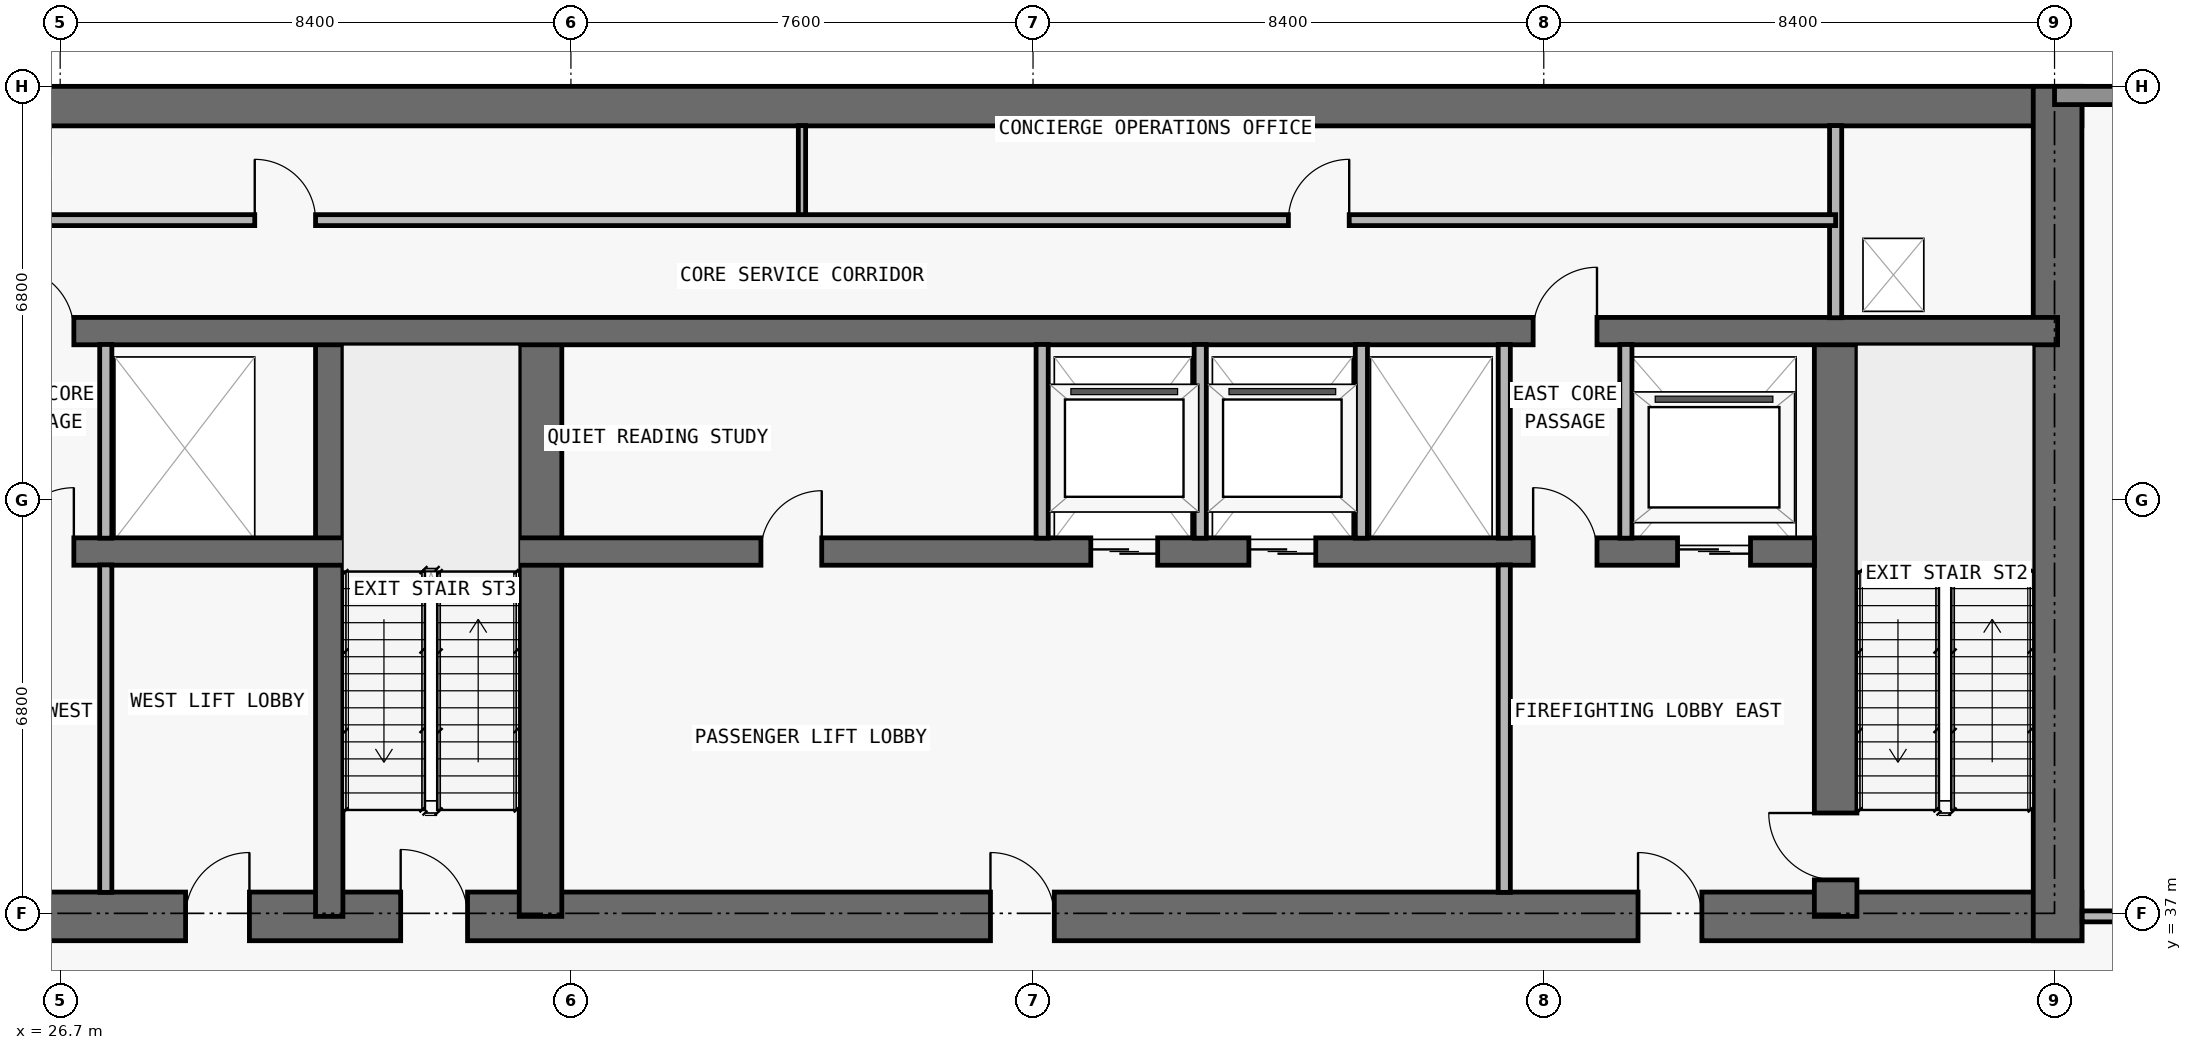
"""IFC4 building model, lengths in metres.
Left out: names, types, materials, properties, quantities, classifications, styles, units other than length and angle.
Written with IfcOpenShell. Run it as: python <this file> out.ifc"""

import sys

from ifc_helpers import new_model, si_unit, direction, frame, frame_2d, origin, place, context, subcontext, project, spatial, rectangle, extrude, element, fill, save


model = new_model("IFC4")
c1 = context("Model", 3, precision=1e-05, world=origin(), true_north=direction((0.0, 1.0)))
c2 = subcontext(c1, "Body", "Model", "MODEL_VIEW")
j1 = project(units=[si_unit("LENGTHUNIT", "METRE"), si_unit("PLANEANGLEUNIT", "RADIAN")], contexts=[c1])
p1 = place(None, origin())
s1 = spatial("IfcSite", under=j1, at=p1, CompositionType="ELEMENT")
p2 = place(p1, origin())
s2 = spatial("IfcBuilding", under=s1, at=p2, CompositionType="ELEMENT")
p3 = place(p2, frame((0.0, 0.0, 152.1)))
s3 = spatial("IfcBuildingStorey", under=s2, at=p3, CompositionType="ELEMENT", Elevation=152.1)
p4 = place(p3, frame((17.85, 36.95, 0.0), z_axis=(0.0, 0.0, 1.0), x_axis=(1.0, 0.0, 0.0)))
e1 = element("IfcWall", 1, at=p4, inside=s3, PredefinedType="SHEAR", context=c2, shape_type="SweptSolid", body=[
    extrude(rectangle(XDim=42.1, YDim=0.8, at=frame_2d((21.05, 0.0))), origin(), (0.0, 0.0, 1.0), 4.85),
])
p5 = place(p4, frame((14.45, 0.0, 0.0)))
e2 = element("IfcOpeningElement", 2, at=p5, cuts=e1, PredefinedType="OPENING", context=c2, shape_type="SweptSolid", body=[
    extrude(rectangle(XDim=1.1, YDim=2.15, at=frame_2d((0.55, 1.075))), frame((0.0, 0.41, 0.0), z_axis=(0.0, -1.0, 0.0), x_axis=(1.0, 0.0, 0.0)), (0.0, 0.0, 1.0), 0.82),
])
p6 = place(p4, frame((6.3, 0.0, 0.0)))
e3 = element("IfcOpeningElement", 3, at=p6, cuts=e1, PredefinedType="OPENING", context=c2, shape_type="SweptSolid", body=[
    extrude(rectangle(XDim=1.05, YDim=2.15, at=frame_2d((0.525, 1.075))), frame((0.0, 0.41, 0.0), z_axis=(0.0, -1.0, 0.0), x_axis=(1.0, 0.0, 0.0)), (0.0, 0.0, 1.0), 0.82),
])
p7 = place(p4, frame((34.8, 0.0, 0.0)))
e4 = element("IfcOpeningElement", 4, at=p7, cuts=e1, PredefinedType="OPENING", context=c2, shape_type="SweptSolid", body=[
    extrude(rectangle(XDim=1.05, YDim=2.15, at=frame_2d((0.525, 1.075))), frame((0.0, 0.41, 0.0), z_axis=(0.0, -1.0, 0.0), x_axis=(1.0, 0.0, 0.0)), (0.0, 0.0, 1.0), 0.82),
])
p8 = place(p4, frame((10.913, 0.0, 0.0)))
e5 = element("IfcOpeningElement", 5, at=p8, cuts=e1, PredefinedType="OPENING", context=c2, shape_type="SweptSolid", body=[
    extrude(rectangle(XDim=1.05, YDim=2.15, at=frame_2d((0.525, 1.075))), frame((0.0, 0.41, 0.0), z_axis=(0.0, -1.0, 0.0), x_axis=(1.0, 0.0, 0.0)), (0.0, 0.0, 1.0), 0.82),
])
p9 = place(p4, frame((24.15, 0.0, 0.0)))
e6 = element("IfcOpeningElement", 6, at=p9, cuts=e1, PredefinedType="OPENING", context=c2, shape_type="SweptSolid", body=[
    extrude(rectangle(XDim=1.05, YDim=2.15, at=frame_2d((0.525, 1.075))), frame((0.0, 0.41, 0.0), z_axis=(0.0, -1.0, 0.0), x_axis=(1.0, 0.0, 0.0)), (0.0, 0.0, 1.0), 0.82),
])
p10 = place(p3, frame((17.85, 50.275, 0.0), z_axis=(0.0, 0.0, 1.0), x_axis=(1.0, 0.0, 0.0)))
e7 = element("IfcWall", 7, at=p10, inside=s3, PredefinedType="SHEAR", context=c2, shape_type="SweptSolid", body=[
    extrude(rectangle(XDim=42.1, YDim=0.65, at=frame_2d((21.05, 0.0))), origin(), (0.0, 0.0, 1.0), 4.85),
])
p11 = place(p3, frame((59.55, 36.55, 0.0), z_axis=(0.0, 0.0, 1.0), x_axis=(0.0, 1.0, 0.0)))
e8 = element("IfcWall", 8, at=p11, inside=s3, PredefinedType="SHEAR", context=c2, shape_type="SweptSolid", body=[
    extrude(rectangle(XDim=14.05, YDim=0.8, at=frame_2d((7.025, 0.0))), origin(), (0.0, 0.0, 1.0), 4.85),
])
p12 = place(p3, frame((55.9, 36.95, 0.0), z_axis=(0.0, 0.0, 1.0), x_axis=(0.0, 1.0, 0.0)))
e9 = element("IfcWall", 9, at=p12, inside=s3, PredefinedType="SHEAR", context=c2, shape_type="SweptSolid", body=[
    extrude(rectangle(XDim=9.625, YDim=0.7, at=frame_2d((4.812, 0.0))), origin(), (0.0, 0.0, 1.0), 4.85),
])
p13 = place(p12, frame((0.6, 0.0, 0.0)))
e10 = element("IfcOpeningElement", 10, at=p13, cuts=e9, PredefinedType="OPENING", context=c2, shape_type="SweptSolid", body=[
    extrude(rectangle(XDim=1.1, YDim=2.15, at=frame_2d((0.55, 1.075))), frame((0.0, 0.36, 0.0), z_axis=(0.0, -1.0, 0.0), x_axis=(1.0, 0.0, 0.0)), (0.0, 0.0, 1.0), 0.72),
])
p14 = place(p3, frame((31.125, 36.95, 0.0), z_axis=(0.0, 0.0, 1.0), x_axis=(0.0, 1.0, 0.0)))
e11 = element("IfcWall", 11, at=p14, inside=s3, PredefinedType="SHEAR", context=c2, shape_type="SweptSolid", body=[
    extrude(rectangle(XDim=9.625, YDim=0.45, at=frame_2d((4.812, 0.0))), origin(), (0.0, 0.0, 1.0), 4.85),
])
p15 = place(p3, frame((34.6, 36.95, 0.0), z_axis=(0.0, 0.0, 1.0), x_axis=(0.0, 1.0, 0.0)))
e12 = element("IfcWall", 12, at=p15, inside=s3, PredefinedType="SHEAR", context=c2, shape_type="SweptSolid", body=[
    extrude(rectangle(XDim=9.625, YDim=0.7, at=frame_2d((4.812, 0.0))), origin(), (0.0, 0.0, 1.0), 4.85),
])
p16 = place(p3, frame((22.25, 42.95, 0.0), z_axis=(0.0, 0.0, 1.0), x_axis=(1.0, 0.0, 0.0)))
e13 = element("IfcWall", 13, at=p16, inside=s3, PredefinedType="SHEAR", context=c2, shape_type="SweptSolid", body=[
    extrude(rectangle(XDim=33.3, YDim=0.45, at=frame_2d((16.65, 0.0))), origin(), (0.0, 0.0, 1.0), 4.85),
])
p17 = place(p16, frame((1.05, 0.0, 0.0)))
e14 = element("IfcOpeningElement", 14, at=p17, cuts=e13, PredefinedType="OPENING", context=c2, shape_type="SweptSolid", body=[
    extrude(rectangle(XDim=1.2, YDim=2.2, at=frame_2d((0.6, 1.1))), frame((0.0, 0.235, 0.0), z_axis=(0.0, -1.0, 0.0), x_axis=(1.0, 0.0, 0.0)), (0.0, 0.0, 1.0), 0.47),
])
p18 = place(p16, frame((31.05, 0.0, 0.0)))
e15 = element("IfcOpeningElement", 15, at=p18, cuts=e13, PredefinedType="OPENING", context=c2, shape_type="SweptSolid", body=[
    extrude(rectangle(XDim=1.2, YDim=2.2, at=frame_2d((0.6, 1.1))), frame((0.0, 0.235, 0.0), z_axis=(0.0, -1.0, 0.0), x_axis=(1.0, 0.0, 0.0)), (0.0, 0.0, 1.0), 0.47),
])
p19 = place(p16, frame((21.4, 0.0, 0.0)))
e16 = element("IfcOpeningElement", 16, at=p19, cuts=e13, PredefinedType="OPENING", context=c2, shape_type="SweptSolid", body=[
    extrude(rectangle(XDim=1.1, YDim=2.2, at=frame_2d((0.55, 1.1))), frame((0.0, 0.235, 0.0), z_axis=(0.0, -1.0, 0.0), x_axis=(1.0, 0.0, 0.0)), (0.0, 0.0, 1.0), 0.47),
])
p20 = place(p16, frame((24.0, 0.0, 0.0)))
e17 = element("IfcOpeningElement", 17, at=p20, cuts=e13, PredefinedType="OPENING", context=c2, shape_type="SweptSolid", body=[
    extrude(rectangle(XDim=1.1, YDim=2.2, at=frame_2d((0.55, 1.1))), frame((0.0, 0.235, 0.0), z_axis=(0.0, -1.0, 0.0), x_axis=(1.0, 0.0, 0.0)), (0.0, 0.0, 1.0), 0.47),
])
p21 = place(p16, frame((3.625, 0.0, 0.0)))
e18 = element("IfcOpeningElement", 18, at=p21, cuts=e13, PredefinedType="OPENING", context=c2, shape_type="SweptSolid", body=[
    extrude(rectangle(XDim=1.05, YDim=2.15, at=frame_2d((0.525, 1.075))), frame((0.0, 0.235, 0.0), z_axis=(0.0, -1.0, 0.0), x_axis=(1.0, 0.0, 0.0)), (0.0, 0.0, 1.0), 0.47),
])
p22 = place(p16, frame((28.675, 0.0, 0.0)))
e19 = element("IfcOpeningElement", 19, at=p22, cuts=e13, PredefinedType="OPENING", context=c2, shape_type="SweptSolid", body=[
    extrude(rectangle(XDim=1.05, YDim=2.15, at=frame_2d((0.525, 1.075))), frame((0.0, 0.235, 0.0), z_axis=(0.0, -1.0, 0.0), x_axis=(1.0, 0.0, 0.0)), (0.0, 0.0, 1.0), 0.47),
])
p23 = place(p16, frame((15.975, 0.0, 0.0)))
e20 = element("IfcOpeningElement", 20, at=p23, cuts=e13, PredefinedType="OPENING", context=c2, shape_type="SweptSolid", body=[
    extrude(rectangle(XDim=1.0, YDim=2.2, at=frame_2d((0.5, 1.1))), frame((0.0, 0.235, 0.0), z_axis=(0.0, -1.0, 0.0), x_axis=(1.0, 0.0, 0.0)), (0.0, 0.0, 1.0), 0.47),
])
p24 = place(p3, frame((18.25, 46.575, 0.0), z_axis=(0.0, 0.0, 1.0), x_axis=(1.0, 0.0, 0.0)))
e21 = element("IfcWall", 21, at=p24, inside=s3, PredefinedType="SHEAR", context=c2, shape_type="SweptSolid", body=[
    extrude(rectangle(XDim=41.3, YDim=0.45, at=frame_2d((20.65, 0.0))), origin(), (0.0, 0.0, 1.0), 4.85),
])
p25 = place(p24, frame((7.625, 0.0, 0.0)))
e22 = element("IfcOpeningElement", 22, at=p25, cuts=e21, PredefinedType="OPENING", context=c2, shape_type="SweptSolid", body=[
    extrude(rectangle(XDim=1.05, YDim=2.15, at=frame_2d((0.525, 1.075))), frame((0.0, 0.235, 0.0), z_axis=(0.0, -1.0, 0.0), x_axis=(1.0, 0.0, 0.0)), (0.0, 0.0, 1.0), 0.47),
])
p26 = place(p24, frame((32.675, 0.0, 0.0)))
e23 = element("IfcOpeningElement", 23, at=p26, cuts=e21, PredefinedType="OPENING", context=c2, shape_type="SweptSolid", body=[
    extrude(rectangle(XDim=1.05, YDim=2.15, at=frame_2d((0.525, 1.075))), frame((0.0, 0.235, 0.0), z_axis=(0.0, -1.0, 0.0), x_axis=(1.0, 0.0, 0.0)), (0.0, 0.0, 1.0), 0.47),
])
p27 = place(p3, frame((59.5, 50.45, 0.0), z_axis=(0.0, 0.0, 1.0), x_axis=(1.0, 0.0, 0.0)))
e24 = element("IfcWall", 24, at=p27, inside=s3, PredefinedType="STANDARD", context=c2, shape_type="SweptSolid", body=[
    extrude(rectangle(XDim=10.6, YDim=0.3, at=frame_2d((5.3, 0.0))), origin(), (0.0, 0.0, 1.0), 4.85),
])
p28 = place(p27, frame((4.2, 0.0, 0.85)))
e25 = element("IfcOpeningElement", 25, at=p28, cuts=e24, PredefinedType="OPENING", context=c2, shape_type="SweptSolid", body=[
    extrude(rectangle(XDim=2.2, YDim=1.55, at=frame_2d((1.1, 0.775))), frame((0.0, 0.16, 0.0), z_axis=(0.0, -1.0, 0.0), x_axis=(1.0, 0.0, 0.0)), (0.0, 0.0, 1.0), 0.32),
])
p29 = place(p3, frame((27.45, 37.345, 0.0), z_axis=(0.0, 0.0, 1.0), x_axis=(0.0, 1.0, 0.0)))
e26 = element("IfcWall", 26, at=p29, inside=s3, PredefinedType="PARTITIONING", context=c2, shape_type="SweptSolid", body=[
    extrude(rectangle(XDim=5.385, YDim=0.2, at=frame_2d((2.692, 0.0))), origin(), (0.0, 0.0, 1.0), 4.85),
])
p30 = place(p3, frame((27.45, 43.17, 0.0), z_axis=(0.0, 0.0, 1.0), x_axis=(0.0, 1.0, 0.0)))
e27 = element("IfcWall", 27, at=p30, inside=s3, PredefinedType="PARTITIONING", context=c2, shape_type="SweptSolid", body=[
    extrude(rectangle(XDim=3.185, YDim=0.2, at=frame_2d((1.593, 0.0))), origin(), (0.0, 0.0, 1.0), 4.85),
])
p31 = place(p3, frame((38.9, 48.4, 0.0), z_axis=(0.0, 0.0, 1.0), x_axis=(0.0, 1.0, 0.0)))
e28 = element("IfcWall", 28, at=p31, inside=s3, PredefinedType="PARTITIONING", context=c2, shape_type="SweptSolid", body=[
    extrude(rectangle(XDim=1.555, YDim=0.12, at=frame_2d((0.778, 0.0))), origin(), (0.0, 0.0, 1.0), 4.85),
])
for number, where, z_axis, x_axis in (
    (29, (42.85, 43.17, 0.0), (0.0, 0.0, 1.0), (0.0, 1.0, 0.0)),
    (30, (45.45, 43.17, 0.0), (0.0, 0.0, 1.0), (0.0, 1.0, 0.0)),
    (31, (48.1, 43.17, 0.0), (0.0, 0.0, 1.0), (0.0, 1.0, 0.0)),
):
    element("IfcWall", number, at=place(p3, frame(where, z_axis=z_axis, x_axis=x_axis)), inside=s3, PredefinedType="PARTITIONING", context=c2, shape_type="SweptSolid", body=[
        extrude(rectangle(XDim=3.185, YDim=0.2, at=frame_2d((1.593, 0.0))), origin(), (0.0, 0.0, 1.0), 4.85),
    ])
p32 = place(p3, frame((50.45, 37.345, 0.0), z_axis=(0.0, 0.0, 1.0), x_axis=(0.0, 1.0, 0.0)))
e32 = element("IfcWall", 32, at=p32, inside=s3, PredefinedType="PARTITIONING", context=c2, shape_type="SweptSolid", body=[
    extrude(rectangle(XDim=5.385, YDim=0.2, at=frame_2d((2.692, 0.0))), origin(), (0.0, 0.0, 1.0), 4.85),
])
for number, where, z_axis, x_axis in (
    (33, (50.45, 43.17, 0.0), (0.0, 0.0, 1.0), (0.0, 1.0, 0.0)),
    (34, (52.45, 43.17, 0.0), (0.0, 0.0, 1.0), (0.0, 1.0, 0.0)),
):
    element("IfcWall", number, at=place(p3, frame(where, z_axis=z_axis, x_axis=x_axis)), inside=s3, PredefinedType="PARTITIONING", context=c2, shape_type="SweptSolid", body=[
        extrude(rectangle(XDim=3.185, YDim=0.2, at=frame_2d((1.593, 0.0))), origin(), (0.0, 0.0, 1.0), 4.85),
    ])
p33 = place(p3, frame((55.9, 46.795, 0.0), z_axis=(0.0, 0.0, 1.0), x_axis=(0.0, 1.0, 0.0)))
e35 = element("IfcWall", 35, at=p33, inside=s3, PredefinedType="PARTITIONING", context=c2, shape_type="SweptSolid", body=[
    extrude(rectangle(XDim=3.16, YDim=0.2, at=frame_2d((1.58, 0.0))), origin(), (0.0, 0.0, 1.0), 4.85),
])
p34 = place(p3, frame((59.955, 36.95, 0.0), z_axis=(0.0, 0.0, 1.0), x_axis=(1.0, 0.0, 0.0)))
e36 = element("IfcWall", 36, at=p34, inside=s3, PredefinedType="PARTITIONING", context=c2, shape_type="SweptSolid", body=[
    extrude(rectangle(XDim=10.145, YDim=0.18, at=frame_2d((5.073, 0.0))), origin(), (0.0, 0.0, 1.0), 4.85),
])
p35 = place(p34, frame((4.472, 0.0, 0.0)))
e37 = element("IfcOpeningElement", 37, at=p35, cuts=e36, PredefinedType="OPENING", context=c2, shape_type="SweptSolid", body=[
    extrude(rectangle(XDim=1.2, YDim=2.2, at=frame_2d((0.6, 1.1))), frame((0.0, 0.1, 0.0), z_axis=(0.0, -1.0, 0.0), x_axis=(1.0, 0.0, 0.0)), (0.0, 0.0, 1.0), 0.2),
])
p36 = place(p3, frame((21.9, 48.4, 0.0), z_axis=(0.0, 0.0, 1.0), x_axis=(1.0, 0.0, 0.0)))
e38 = element("IfcWall", 38, at=p36, inside=s3, PredefinedType="PARTITIONING", context=c2, shape_type="SweptSolid", body=[
    extrude(rectangle(XDim=34.0, YDim=0.18, at=frame_2d((17.0, 0.0))), origin(), (0.0, 0.0, 1.0), 4.85),
])
p37 = place(p36, frame((8.0, 0.0, 0.0)))
e39 = element("IfcOpeningElement", 39, at=p37, cuts=e38, PredefinedType="OPENING", context=c2, shape_type="SweptSolid", body=[
    extrude(rectangle(XDim=1.0, YDim=2.2, at=frame_2d((0.5, 1.1))), frame((0.0, 0.1, 0.0), z_axis=(0.0, -1.0, 0.0), x_axis=(1.0, 0.0, 0.0)), (0.0, 0.0, 1.0), 0.2),
])
p38 = place(p36, frame((25.0, 0.0, 0.0)))
e40 = element("IfcOpeningElement", 40, at=p38, cuts=e38, PredefinedType="OPENING", context=c2, shape_type="SweptSolid", body=[
    extrude(rectangle(XDim=1.0, YDim=2.2, at=frame_2d((0.5, 1.1))), frame((0.0, 0.1, 0.0), z_axis=(0.0, -1.0, 0.0), x_axis=(1.0, 0.0, 0.0)), (0.0, 0.0, 1.0), 0.2),
])
p39 = place(p18, origin())
e41 = element("IfcDoor", 41, at=p39, inside=s3, OperationType="DOUBLE_DOOR_SLIDING", PredefinedType="DOOR", context=c2, shape_type="SweptSolid", body=[
    extrude(rectangle(XDim=1.2, YDim=2.2, at=frame_2d((0.6, 1.1))), frame((0.0, 0.025, 0.0), z_axis=(0.0, -1.0, 0.0), x_axis=(1.0, 0.0, 0.0)), (0.0, 0.0, 1.0), 0.05),
])
fill(e15, e41)
p40 = place(p19, origin())
e42 = element("IfcDoor", 42, at=p40, inside=s3, OperationType="DOUBLE_DOOR_SLIDING", PredefinedType="DOOR", context=c2, shape_type="SweptSolid", body=[
    extrude(rectangle(XDim=1.1, YDim=2.2, at=frame_2d((0.55, 1.1))), frame((0.0, 0.025, 0.0), z_axis=(0.0, -1.0, 0.0), x_axis=(1.0, 0.0, 0.0)), (0.0, 0.0, 1.0), 0.05),
])
fill(e16, e42)
p41 = place(p20, origin())
e43 = element("IfcDoor", 43, at=p41, inside=s3, OperationType="DOUBLE_DOOR_SLIDING", PredefinedType="DOOR", context=c2, shape_type="SweptSolid", body=[
    extrude(rectangle(XDim=1.1, YDim=2.2, at=frame_2d((0.55, 1.1))), frame((0.0, 0.025, 0.0), z_axis=(0.0, -1.0, 0.0), x_axis=(1.0, 0.0, 0.0)), (0.0, 0.0, 1.0), 0.05),
])
fill(e17, e43)
p42 = place(p5, origin())
e44 = element("IfcDoor", 44, at=p42, inside=s3, OperationType="SINGLE_SWING_LEFT", PredefinedType="DOOR", context=c2, shape_type="SweptSolid", body=[
    extrude(rectangle(XDim=1.1, YDim=2.15, at=frame_2d((0.55, 1.075))), frame((0.0, 0.025, 0.0), z_axis=(0.0, -1.0, 0.0), x_axis=(1.0, 0.0, 0.0)), (0.0, 0.0, 1.0), 0.05),
])
fill(e2, e44)
p43 = place(p21, origin())
e45 = element("IfcDoor", 45, at=p43, inside=s3, OperationType="SINGLE_SWING_RIGHT", PredefinedType="DOOR", context=c2, shape_type="SweptSolid", body=[
    extrude(rectangle(XDim=1.05, YDim=2.15, at=frame_2d((0.525, 1.075))), frame((0.0, 0.025, 0.0), z_axis=(0.0, -1.0, 0.0), x_axis=(1.0, 0.0, 0.0)), (0.0, 0.0, 1.0), 0.05),
])
fill(e18, e45)
p44 = place(p7, origin())
e46 = element("IfcDoor", 46, at=p44, inside=s3, OperationType="SINGLE_SWING_LEFT", PredefinedType="DOOR", context=c2, shape_type="SweptSolid", body=[
    extrude(rectangle(XDim=1.05, YDim=2.15, at=frame_2d((0.525, 1.075))), frame((0.0, 0.025, 0.0), z_axis=(0.0, -1.0, 0.0), x_axis=(1.0, 0.0, 0.0)), (0.0, 0.0, 1.0), 0.05),
])
fill(e4, e46)
p45 = place(p13, origin())
e47 = element("IfcDoor", 47, at=p45, inside=s3, OperationType="SINGLE_SWING_RIGHT", PredefinedType="DOOR", context=c2, shape_type="SweptSolid", body=[
    extrude(rectangle(XDim=1.1, YDim=2.15, at=frame_2d((0.55, 1.075))), frame((0.0, 0.025, 0.0), z_axis=(0.0, -1.0, 0.0), x_axis=(1.0, 0.0, 0.0)), (0.0, 0.0, 1.0), 0.05),
])
fill(e10, e47)
p46 = place(p22, origin())
e48 = element("IfcDoor", 48, at=p46, inside=s3, OperationType="SINGLE_SWING_LEFT", PredefinedType="DOOR", context=c2, shape_type="SweptSolid", body=[
    extrude(rectangle(XDim=1.05, YDim=2.15, at=frame_2d((0.525, 1.075))), frame((0.0, 0.025, 0.0), z_axis=(0.0, -1.0, 0.0), x_axis=(1.0, 0.0, 0.0)), (0.0, 0.0, 1.0), 0.05),
])
fill(e19, e48)
p47 = place(p8, origin())
e49 = element("IfcDoor", 49, at=p47, inside=s3, OperationType="SINGLE_SWING_RIGHT", PredefinedType="DOOR", context=c2, shape_type="SweptSolid", body=[
    extrude(rectangle(XDim=1.05, YDim=2.15, at=frame_2d((0.525, 1.075))), frame((0.0, 0.025, 0.0), z_axis=(0.0, -1.0, 0.0), x_axis=(1.0, 0.0, 0.0)), (0.0, 0.0, 1.0), 0.05),
])
fill(e5, e49)
p48 = place(p9, origin())
e50 = element("IfcDoor", 50, at=p48, inside=s3, OperationType="SINGLE_SWING_LEFT", PredefinedType="DOOR", context=c2, shape_type="SweptSolid", body=[
    extrude(rectangle(XDim=1.05, YDim=2.15, at=frame_2d((0.525, 1.075))), frame((0.0, 0.025, 0.0), z_axis=(0.0, -1.0, 0.0), x_axis=(1.0, 0.0, 0.0)), (0.0, 0.0, 1.0), 0.05),
])
fill(e6, e50)
p49 = place(p23, origin())
e51 = element("IfcDoor", 51, at=p49, inside=s3, OperationType="SINGLE_SWING_RIGHT", PredefinedType="DOOR", context=c2, shape_type="SweptSolid", body=[
    extrude(rectangle(XDim=1.0, YDim=2.2, at=frame_2d((0.5, 1.1))), frame((0.0, 0.025, 0.0), z_axis=(0.0, -1.0, 0.0), x_axis=(1.0, 0.0, 0.0)), (0.0, 0.0, 1.0), 0.05),
])
fill(e20, e51)
p50 = place(p25, origin())
e52 = element("IfcDoor", 52, at=p50, inside=s3, OperationType="SINGLE_SWING_LEFT", PredefinedType="DOOR", context=c2, shape_type="SweptSolid", body=[
    extrude(rectangle(XDim=1.05, YDim=2.15, at=frame_2d((0.525, 1.075))), frame((0.0, 0.025, 0.0), z_axis=(0.0, -1.0, 0.0), x_axis=(1.0, 0.0, 0.0)), (0.0, 0.0, 1.0), 0.05),
])
fill(e22, e52)
p51 = place(p26, origin())
e53 = element("IfcDoor", 53, at=p51, inside=s3, OperationType="SINGLE_SWING_RIGHT", PredefinedType="DOOR", context=c2, shape_type="SweptSolid", body=[
    extrude(rectangle(XDim=1.05, YDim=2.15, at=frame_2d((0.525, 1.075))), frame((0.0, 0.025, 0.0), z_axis=(0.0, -1.0, 0.0), x_axis=(1.0, 0.0, 0.0)), (0.0, 0.0, 1.0), 0.05),
])
fill(e23, e53)
p52 = place(p37, origin())
e54 = element("IfcDoor", 54, at=p52, inside=s3, OperationType="SINGLE_SWING_LEFT", PredefinedType="DOOR", context=c2, shape_type="SweptSolid", body=[
    extrude(rectangle(XDim=1.0, YDim=2.2, at=frame_2d((0.5, 1.1))), frame((0.0, 0.025, 0.0), z_axis=(0.0, -1.0, 0.0), x_axis=(1.0, 0.0, 0.0)), (0.0, 0.0, 1.0), 0.05),
])
fill(e39, e54)
p53 = place(p38, origin())
e55 = element("IfcDoor", 55, at=p53, inside=s3, OperationType="SINGLE_SWING_RIGHT", PredefinedType="DOOR", context=c2, shape_type="SweptSolid", body=[
    extrude(rectangle(XDim=1.0, YDim=2.2, at=frame_2d((0.5, 1.1))), frame((0.0, 0.025, 0.0), z_axis=(0.0, -1.0, 0.0), x_axis=(1.0, 0.0, 0.0)), (0.0, 0.0, 1.0), 0.05),
])
fill(e40, e55)
save(model, sys.argv[1])
